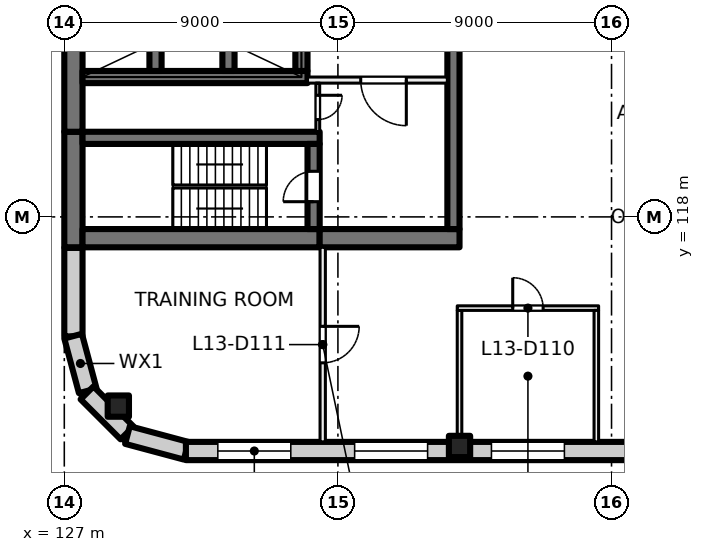
"""IFC4 building model, lengths in metres.
Left out: names, types, materials, properties, quantities, classifications, styles, units other than length and angle.
Written with IfcOpenShell. Run it as: python <this file> out.ifc"""

import sys

from ifc_helpers import new_model, si_unit, direction, frame, frame_2d, origin, origin_2d, place, context, subcontext, project, spatial, rectangle, extrude, element, fill, save


model = new_model("IFC4")
c1 = context("Model", 3, precision=1e-05, world=origin(), true_north=direction((0.0, 1.0)))
c2 = subcontext(c1, "Body", "Model", "MODEL_VIEW")
j1 = project(units=[si_unit("LENGTHUNIT", "METRE"), si_unit("PLANEANGLEUNIT", "RADIAN")], contexts=[c1])
p1 = place(None, origin())
s1 = spatial("IfcSite", under=j1, at=p1, CompositionType="ELEMENT")
p2 = place(p1, origin())
s2 = spatial("IfcBuilding", under=s1, at=p2, CompositionType="ELEMENT")
p3 = place(p2, frame((0.0, 0.0, 59.5)))
s3 = spatial("IfcBuildingStorey", under=s2, at=p3, CompositionType="ELEMENT", Elevation=59.5)
for number, where, z_axis, x_axis in (
    (1, (128.777, 111.777, 0.0), (0.0, 0.0, 1.0), (1.0, 0.0, 0.0)),
    (2, (140.0, 110.45, 0.0), (0.0, 0.0, 1.0), (1.0, 0.0, 0.0)),
):
    element("IfcColumn", number, at=place(p3, frame(where, z_axis=z_axis, x_axis=x_axis)), inside=s3, PredefinedType="COLUMN", context=c2, shape_type="SweptSolid", body=[
        extrude(rectangle(XDim=0.7, YDim=0.7, at=origin_2d()), origin(), (0.0, 0.0, 1.0), 4.0),
    ])
p4 = place(p3, frame((127.3, 117.0, 0.0), z_axis=(0.0, 0.0, 1.0), x_axis=(0.0, 1.0, 0.0)))
e3 = element("IfcWall", 3, at=p4, inside=s3, PredefinedType="SHEAR", context=c2, shape_type="SweptSolid", body=[
    extrude(rectangle(XDim=3.8, YDim=0.6, at=frame_2d((1.9, 0.0))), origin(), (0.0, 0.0, 1.0), 4.0),
])
p5 = place(p3, frame((127.3, 120.8, 0.0), z_axis=(0.0, 0.0, 1.0), x_axis=(0.0, 1.0, 0.0)))
e4 = element("IfcWall", 4, at=p5, inside=s3, PredefinedType="SHEAR", context=c2, shape_type="SweptSolid", body=[
    extrude(rectangle(XDim=14.4, YDim=0.6, at=frame_2d((7.2, 0.0))), origin(), (0.0, 0.0, 1.0), 4.0),
])
p6 = place(p3, frame((127.6, 117.3, 0.0), z_axis=(0.0, 0.0, 1.0), x_axis=(1.0, 0.0, 0.0)))
e5 = element("IfcWall", 5, at=p6, inside=s3, PredefinedType="SHEAR", context=c2, shape_type="SweptSolid", body=[
    extrude(rectangle(XDim=7.8, YDim=0.6, at=frame_2d((3.9, 0.0))), origin(), (0.0, 0.0, 1.0), 4.0),
])
p7 = place(p3, frame((135.4, 117.3, 0.0), z_axis=(0.0, 0.0, 1.0), x_axis=(1.0, 0.0, 0.0)))
e6 = element("IfcWall", 6, at=p7, inside=s3, PredefinedType="SHEAR", context=c2, shape_type="SweptSolid", body=[
    extrude(rectangle(XDim=4.6, YDim=0.6, at=frame_2d((2.3, 0.0))), origin(), (0.0, 0.0, 1.0), 4.0),
])
p8 = place(p3, frame((127.6, 120.6, 0.0), z_axis=(0.0, 0.0, 1.0), x_axis=(1.0, 0.0, 0.0)))
e7 = element("IfcWall", 7, at=p8, inside=s3, PredefinedType="SHEAR", context=c2, shape_type="SweptSolid", body=[
    extrude(rectangle(XDim=7.8, YDim=0.4, at=frame_2d((3.9, 0.0))), origin(), (0.0, 0.0, 1.0), 4.0),
])
p9 = place(p3, frame((135.2, 117.6, 0.0), z_axis=(0.0, 0.0, 1.0), x_axis=(0.0, 1.0, 0.0)))
e8 = element("IfcWall", 8, at=p9, inside=s3, PredefinedType="SHEAR", context=c2, shape_type="SweptSolid", body=[
    extrude(rectangle(XDim=2.8, YDim=0.4, at=frame_2d((1.4, 0.0))), origin(), (0.0, 0.0, 1.0), 4.0),
])
p10 = place(p9, frame((0.9, 0.0, 0.0)))
e9 = element("IfcOpeningElement", 9, at=p10, cuts=e8, PredefinedType="OPENING", context=c2, shape_type="SweptSolid", body=[
    extrude(rectangle(XDim=1.0, YDim=2.1, at=frame_2d((0.5, 1.05))), frame((0.0, 0.21, 0.0), z_axis=(0.0, -1.0, 0.0), x_axis=(1.0, 0.0, 0.0)), (0.0, 0.0, 1.0), 0.42),
])
p11 = place(p3, frame((127.6, 122.6, 0.0), z_axis=(0.0, 0.0, 1.0), x_axis=(1.0, 0.0, 0.0)))
e10 = element("IfcWall", 10, at=p11, inside=s3, PredefinedType="SHEAR", context=c2, shape_type="SweptSolid", body=[
    extrude(rectangle(XDim=7.4, YDim=0.4, at=frame_2d((3.7, 0.0))), origin(), (0.0, 0.0, 1.0), 4.0),
])
for number, where, z_axis, x_axis in (
    (11, (130.0, 122.8, 0.0), (0.0, 0.0, 1.0), (0.0, 1.0, 0.0)),
    (12, (132.4, 122.8, 0.0), (0.0, 0.0, 1.0), (0.0, 1.0, 0.0)),
    (13, (134.8, 122.8, 0.0), (0.0, 0.0, 1.0), (0.0, 1.0, 0.0)),
):
    element("IfcWall", number, at=place(p3, frame(where, z_axis=z_axis, x_axis=x_axis)), inside=s3, PredefinedType="SHEAR", context=c2, shape_type="SweptSolid", body=[
        extrude(rectangle(XDim=3.0, YDim=0.4, at=frame_2d((1.5, 0.0))), origin(), (0.0, 0.0, 1.0), 4.0),
    ])
p12 = place(p3, frame((139.8, 117.6, 0.0), z_axis=(0.0, 0.0, 1.0), x_axis=(0.0, 1.0, 0.0)))
e14 = element("IfcWall", 14, at=p12, inside=s3, PredefinedType="SHEAR", context=c2, shape_type="SweptSolid", body=[
    extrude(rectangle(XDim=8.6, YDim=0.4, at=frame_2d((4.3, 0.0))), origin(), (0.0, 0.0, 1.0), 4.0),
])
p13 = place(p3, frame((127.3, 114.07, 0.0), z_axis=(0.0, 0.0, 1.0), x_axis=(0.0, 1.0, 0.0)))
e15 = element("IfcWall", 15, at=p13, inside=s3, PredefinedType="SOLIDWALL", context=c2, shape_type="SweptSolid", body=[
    extrude(rectangle(XDim=2.91, YDim=0.6, at=frame_2d((1.455, 0.0))), origin(), (0.0, 0.0, 1.0), 3.625),
])
for number, where, z_axis, x_axis in (
    (16, (127.771, 112.281, 0.0), (0.0, 0.0, 1.0), (-0.259, 0.966, 0.0)),
    (17, (129.064, 110.896, 0.0), (0.0, 0.0, 1.0), (-0.707, 0.707, 0.0)),
):
    element("IfcWall", number, at=place(p3, frame(where, z_axis=z_axis, x_axis=x_axis)), inside=s3, PredefinedType="SOLIDWALL", context=c2, shape_type="SweptSolid", body=[
        extrude(rectangle(XDim=1.861, YDim=0.6, at=frame_2d((0.93, 0.0))), origin(), (0.0, 0.0, 1.0), 3.625),
    ])
p14 = place(p3, frame((131.01, 110.308, 0.0), z_axis=(0.0, 0.0, 1.0), x_axis=(-0.965920269068, 0.258839784042, 0.0)))
e18 = element("IfcWall", 18, at=p14, inside=s3, PredefinedType="SOLIDWALL", context=c2, shape_type="SweptSolid", body=[
    extrude(rectangle(XDim=2.0, YDim=0.6, at=frame_2d((1.0, 0.0))), origin(), (0.0, 0.0, 1.0), 3.625),
])
p15 = place(p3, frame((162.93, 110.3, 0.0), z_axis=(0.0, 0.0, 1.0), x_axis=(-1.0, 0.0, 0.0)))
e19 = element("IfcWall", 19, at=p15, inside=s3, PredefinedType="SOLIDWALL", context=c2, shape_type="SweptSolid", body=[
    extrude(rectangle(XDim=31.93, YDim=0.6, at=frame_2d((15.965, 0.0))), origin(), (0.0, 0.0, 1.0), 3.625),
])
p16 = place(p15, frame((1.48, 0.0, 0.9)))
e20 = element("IfcOpeningElement", 20, at=p16, cuts=e19, PredefinedType="OPENING", context=c2, shape_type="SweptSolid", body=[
    extrude(rectangle(XDim=2.4, YDim=2.4, at=frame_2d((1.2, 1.2))), frame((0.0, 0.31, 0.0), z_axis=(0.0, -1.0, 0.0), x_axis=(1.0, 0.0, 0.0)), (0.0, 0.0, 1.0), 0.62),
])
p17 = place(p15, frame((5.98, 0.0, 0.9)))
e21 = element("IfcOpeningElement", 21, at=p17, cuts=e19, PredefinedType="OPENING", context=c2, shape_type="SweptSolid", body=[
    extrude(rectangle(XDim=2.4, YDim=2.4, at=frame_2d((1.2, 1.2))), frame((0.0, 0.31, 0.0), z_axis=(0.0, -1.0, 0.0), x_axis=(1.0, 0.0, 0.0)), (0.0, 0.0, 1.0), 0.62),
])
p18 = place(p15, frame((10.48, 0.0, 0.9)))
e22 = element("IfcOpeningElement", 22, at=p18, cuts=e19, PredefinedType="OPENING", context=c2, shape_type="SweptSolid", body=[
    extrude(rectangle(XDim=2.4, YDim=2.4, at=frame_2d((1.2, 1.2))), frame((0.0, 0.31, 0.0), z_axis=(0.0, -1.0, 0.0), x_axis=(1.0, 0.0, 0.0)), (0.0, 0.0, 1.0), 0.62),
])
p19 = place(p15, frame((14.98, 0.0, 0.9)))
e23 = element("IfcOpeningElement", 23, at=p19, cuts=e19, PredefinedType="OPENING", context=c2, shape_type="SweptSolid", body=[
    extrude(rectangle(XDim=2.4, YDim=2.4, at=frame_2d((1.2, 1.2))), frame((0.0, 0.31, 0.0), z_axis=(0.0, -1.0, 0.0), x_axis=(1.0, 0.0, 0.0)), (0.0, 0.0, 1.0), 0.62),
])
p20 = place(p15, frame((19.48, 0.0, 0.9)))
e24 = element("IfcOpeningElement", 24, at=p20, cuts=e19, PredefinedType="OPENING", context=c2, shape_type="SweptSolid", body=[
    extrude(rectangle(XDim=2.4, YDim=2.4, at=frame_2d((1.2, 1.2))), frame((0.0, 0.31, 0.0), z_axis=(0.0, -1.0, 0.0), x_axis=(1.0, 0.0, 0.0)), (0.0, 0.0, 1.0), 0.62),
])
p21 = place(p15, frame((23.98, 0.0, 0.9)))
e25 = element("IfcOpeningElement", 25, at=p21, cuts=e19, PredefinedType="OPENING", context=c2, shape_type="SweptSolid", body=[
    extrude(rectangle(XDim=2.4, YDim=2.4, at=frame_2d((1.2, 1.2))), frame((0.0, 0.31, 0.0), z_axis=(0.0, -1.0, 0.0), x_axis=(1.0, 0.0, 0.0)), (0.0, 0.0, 1.0), 0.62),
])
p22 = place(p15, frame((28.48, 0.0, 0.9)))
e26 = element("IfcOpeningElement", 26, at=p22, cuts=e19, PredefinedType="OPENING", context=c2, shape_type="SweptSolid", body=[
    extrude(rectangle(XDim=2.4, YDim=2.4, at=frame_2d((1.2, 1.2))), frame((0.0, 0.31, 0.0), z_axis=(0.0, -1.0, 0.0), x_axis=(1.0, 0.0, 0.0)), (0.0, 0.0, 1.0), 0.62),
])
p23 = place(p3, frame((139.6, 122.5, 0.0), z_axis=(0.0, 0.0, 1.0), x_axis=(-1.0, 0.0, 0.0)))
e27 = element("IfcWall", 27, at=p23, inside=s3, PredefinedType="PARTITIONING", context=c2, shape_type="SweptSolid", body=[
    extrude(rectangle(XDim=4.6, YDim=0.2, at=frame_2d((2.3, 0.0))), origin(), (0.0, 0.0, 1.0), 3.625),
])
p24 = place(p23, frame((1.35, 0.0, 0.0)))
e28 = element("IfcOpeningElement", 28, at=p24, cuts=e27, PredefinedType="OPENING", context=c2, shape_type="SweptSolid", body=[
    extrude(rectangle(XDim=1.5, YDim=2.1, at=frame_2d((0.75, 1.05))), frame((0.0, 0.11, 0.0), z_axis=(0.0, -1.0, 0.0), x_axis=(1.0, 0.0, 0.0)), (0.0, 0.0, 1.0), 0.22),
])
p25 = place(p3, frame((135.337, 122.4, 0.0), z_axis=(0.0, 0.0, 1.0), x_axis=(0.0, -1.0, 0.0)))
e29 = element("IfcWall", 29, at=p25, inside=s3, PredefinedType="PARTITIONING", context=c2, shape_type="SweptSolid", body=[
    extrude(rectangle(XDim=1.6, YDim=0.125, at=frame_2d((0.8, 0.0))), origin(), (0.0, 0.0, 1.0), 3.625),
])
p26 = place(p25, frame((0.4, 0.0, 0.0)))
e30 = element("IfcOpeningElement", 30, at=p26, cuts=e29, PredefinedType="OPENING", context=c2, shape_type="SweptSolid", body=[
    extrude(rectangle(XDim=0.8, YDim=2.1, at=frame_2d((0.4, 1.05))), frame((0.0, 0.073, 0.0), z_axis=(0.0, -1.0, 0.0), x_axis=(1.0, 0.0, 0.0)), (0.0, 0.0, 1.0), 0.145),
])
p27 = place(p3, frame((135.5, 117.0, 0.0), z_axis=(0.0, 0.0, 1.0), x_axis=(0.0, -1.0, 0.0)))
e31 = element("IfcWall", 31, at=p27, inside=s3, PredefinedType="PARTITIONING", context=c2, shape_type="SweptSolid", body=[
    extrude(rectangle(XDim=6.4, YDim=0.175, at=frame_2d((3.2, 0.0))), origin(), (0.0, 0.0, 1.0), 3.625),
])
p28 = place(p27, frame((2.6, 0.0, 0.0)))
e32 = element("IfcOpeningElement", 32, at=p28, cuts=e31, PredefinedType="OPENING", context=c2, shape_type="SweptSolid", body=[
    extrude(rectangle(XDim=1.2, YDim=2.1, at=frame_2d((0.6, 1.05))), frame((0.0, 0.097, 0.0), z_axis=(0.0, -1.0, 0.0), x_axis=(1.0, 0.0, 0.0)), (0.0, 0.0, 1.0), 0.195),
])
p29 = place(p3, frame((140.0, 110.6, 0.0), z_axis=(0.0, 0.0, 1.0), x_axis=(0.0, 1.0, 0.0)))
e33 = element("IfcWall", 33, at=p29, inside=s3, PredefinedType="PARTITIONING", context=c2, shape_type="SweptSolid", body=[
    extrude(rectangle(XDim=4.325, YDim=0.15, at=frame_2d((2.163, 0.0))), origin(), (0.0, 0.0, 1.0), 3.625),
])
p30 = place(p3, frame((139.925, 115.0, 0.0), z_axis=(0.0, 0.0, 1.0), x_axis=(1.0, 0.0, 0.0)))
e34 = element("IfcWall", 34, at=p30, inside=s3, PredefinedType="PARTITIONING", context=c2, shape_type="SweptSolid", body=[
    extrude(rectangle(XDim=4.65, YDim=0.15, at=frame_2d((2.325, 0.0))), origin(), (0.0, 0.0, 1.0), 3.625),
])
p31 = place(p30, frame((1.825, 0.0, 0.0)))
e35 = element("IfcOpeningElement", 35, at=p31, cuts=e34, PredefinedType="OPENING", context=c2, shape_type="SweptSolid", body=[
    extrude(rectangle(XDim=1.0, YDim=2.1, at=frame_2d((0.5, 1.05))), frame((0.0, 0.085, 0.0), z_axis=(0.0, -1.0, 0.0), x_axis=(1.0, 0.0, 0.0)), (0.0, 0.0, 1.0), 0.17),
])
p32 = place(p3, frame((144.5, 114.925, 0.0), z_axis=(0.0, 0.0, 1.0), x_axis=(0.0, -1.0, 0.0)))
e36 = element("IfcWall", 36, at=p32, inside=s3, PredefinedType="PARTITIONING", context=c2, shape_type="SweptSolid", body=[
    extrude(rectangle(XDim=4.325, YDim=0.15, at=frame_2d((2.163, 0.0))), origin(), (0.0, 0.0, 1.0), 3.625),
])
p33 = place(p20, origin())
e37 = element("IfcWindow", 37, at=p33, inside=s3, PartitioningType="SINGLE_PANEL", PredefinedType="WINDOW", context=c2, shape_type="SweptSolid", body=[
    extrude(rectangle(XDim=2.4, YDim=2.4, at=frame_2d((1.2, 1.2))), frame((0.0, 0.03, 0.0), z_axis=(0.0, -1.0, 0.0), x_axis=(1.0, 0.0, 0.0)), (0.0, 0.0, 1.0), 0.06),
])
fill(e24, e37)
p34 = place(p21, origin())
e38 = element("IfcWindow", 38, at=p34, inside=s3, PartitioningType="SINGLE_PANEL", PredefinedType="WINDOW", context=c2, shape_type="SweptSolid", body=[
    extrude(rectangle(XDim=2.4, YDim=2.4, at=frame_2d((1.2, 1.2))), frame((0.0, 0.03, 0.0), z_axis=(0.0, -1.0, 0.0), x_axis=(1.0, 0.0, 0.0)), (0.0, 0.0, 1.0), 0.06),
])
fill(e25, e38)
p35 = place(p22, origin())
e39 = element("IfcWindow", 39, at=p35, inside=s3, PartitioningType="SINGLE_PANEL", PredefinedType="WINDOW", context=c2, shape_type="SweptSolid", body=[
    extrude(rectangle(XDim=2.4, YDim=2.4, at=frame_2d((1.2, 1.2))), frame((0.0, 0.03, 0.0), z_axis=(0.0, -1.0, 0.0), x_axis=(1.0, 0.0, 0.0)), (0.0, 0.0, 1.0), 0.06),
])
fill(e26, e39)
p36 = place(p24, origin())
e40 = element("IfcDoor", 40, at=p36, inside=s3, OperationType="DOUBLE_DOOR_SINGLE_SWING", PredefinedType="DOOR", context=c2, shape_type="SweptSolid", body=[
    extrude(rectangle(XDim=1.5, YDim=2.1, at=frame_2d((0.75, 1.05))), frame((0.0, 0.025, 0.0), z_axis=(0.0, -1.0, 0.0), x_axis=(1.0, 0.0, 0.0)), (0.0, 0.0, 1.0), 0.05),
])
fill(e28, e40)
p37 = place(p10, origin())
e41 = element("IfcDoor", 41, at=p37, inside=s3, OperationType="SINGLE_SWING_RIGHT", PredefinedType="DOOR", context=c2, shape_type="SweptSolid", body=[
    extrude(rectangle(XDim=1.0, YDim=2.1, at=frame_2d((0.5, 1.05))), frame((0.0, 0.025, 0.0), z_axis=(0.0, -1.0, 0.0), x_axis=(1.0, 0.0, 0.0)), (0.0, 0.0, 1.0), 0.05),
])
fill(e9, e41)
p38 = place(p26, origin())
e42 = element("IfcDoor", 42, at=p38, inside=s3, OperationType="SINGLE_SWING_LEFT", PredefinedType="DOOR", context=c2, shape_type="SweptSolid", body=[
    extrude(rectangle(XDim=0.8, YDim=2.1, at=frame_2d((0.4, 1.05))), frame((0.0, 0.025, 0.0), z_axis=(0.0, -1.0, 0.0), x_axis=(1.0, 0.0, 0.0)), (0.0, 0.0, 1.0), 0.05),
])
fill(e30, e42)
p39 = place(p31, origin())
e43 = element("IfcDoor", 43, at=p39, inside=s3, OperationType="SINGLE_SWING_LEFT", PredefinedType="DOOR", context=c2, shape_type="SweptSolid", body=[
    extrude(rectangle(XDim=1.0, YDim=2.1, at=frame_2d((0.5, 1.05))), frame((0.0, 0.025, 0.0), z_axis=(0.0, -1.0, 0.0), x_axis=(1.0, 0.0, 0.0)), (0.0, 0.0, 1.0), 0.05),
])
fill(e35, e43)
p40 = place(p28, origin())
e44 = element("IfcDoor", 44, at=p40, inside=s3, OperationType="DOUBLE_DOOR_SINGLE_SWING", PredefinedType="DOOR", context=c2, shape_type="SweptSolid", body=[
    extrude(rectangle(XDim=1.2, YDim=2.1, at=frame_2d((0.6, 1.05))), frame((0.0, 0.025, 0.0), z_axis=(0.0, -1.0, 0.0), x_axis=(1.0, 0.0, 0.0)), (0.0, 0.0, 1.0), 0.05),
])
fill(e32, e44)
save(model, sys.argv[1])
